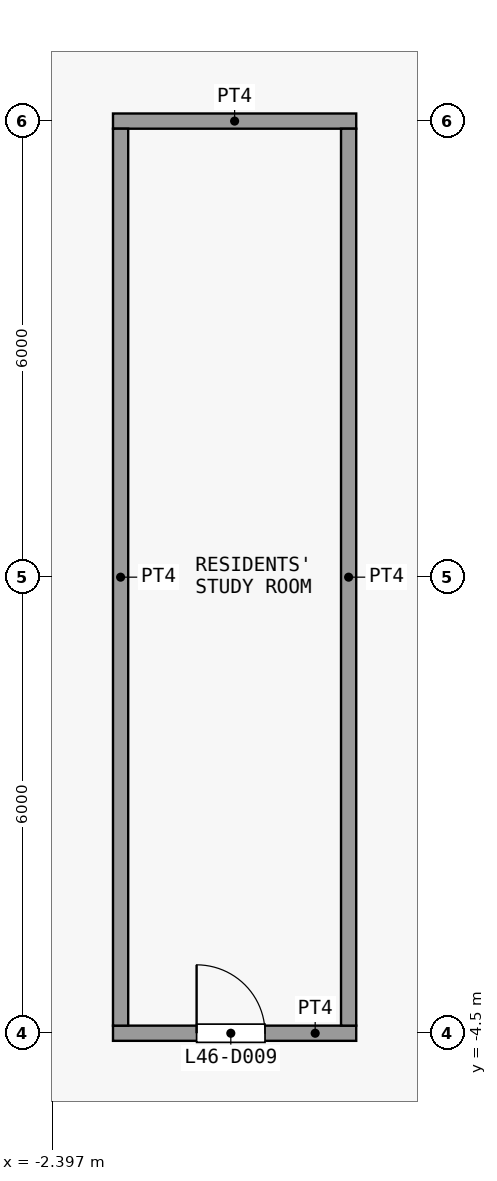
"""IFC4 building model, lengths in metres.
Left out: names, types, materials, properties, quantities, classifications, styles, units other than length and angle.
Written with IfcOpenShell. Run it as: python <this file> out.ifc"""

import sys

from ifc_helpers import new_model, si_unit, direction, frame, frame_2d, origin, place, context, subcontext, project, spatial, rectangle, extrude, element, fill, save


model = new_model("IFC4")
c1 = context("Model", 3, precision=1e-05, world=origin(), true_north=direction((0.0, 1.0)))
c2 = subcontext(c1, "Body", "Model", "MODEL_VIEW")
j1 = project(units=[si_unit("LENGTHUNIT", "METRE"), si_unit("PLANEANGLEUNIT", "RADIAN")], contexts=[c1])
p1 = place(None, origin())
s1 = spatial("IfcSite", under=j1, at=p1, CompositionType="ELEMENT")
p2 = place(p1, origin())
s2 = spatial("IfcBuilding", under=s1, at=p2, CompositionType="ELEMENT")
p3 = place(p2, frame((0.0, 0.0, 185.3)))
s3 = spatial("IfcBuildingStorey", under=s2, at=p3, CompositionType="ELEMENT", Elevation=185.3)
p4 = place(p3, frame((-1.6, -4.5, 0.0), z_axis=(0.0, 0.0, 1.0), x_axis=(1.0, 0.0, 0.0)))
e1 = element("IfcWall", 1, at=p4, inside=s3, PredefinedType="PARTITIONING", context=c2, shape_type="SweptSolid", body=[
    extrude(rectangle(XDim=3.2, YDim=0.2, at=frame_2d((1.6, 0.0))), origin(), (0.0, 0.0, 1.0), 3.3),
])
p5 = place(p4, frame((1.1, 0.0, 0.0)))
e2 = element("IfcOpeningElement", 2, at=p5, cuts=e1, PredefinedType="OPENING", context=c2, shape_type="SweptSolid", body=[
    extrude(rectangle(XDim=0.9, YDim=2.1, at=frame_2d((0.45, 1.05))), frame((0.0, 0.11, 0.0), z_axis=(0.0, -1.0, 0.0), x_axis=(1.0, 0.0, 0.0)), (0.0, 0.0, 1.0), 0.22),
])
p6 = place(p3, frame((-1.6, 7.5, 0.0), z_axis=(0.0, 0.0, 1.0), x_axis=(1.0, 0.0, 0.0)))
e3 = element("IfcWall", 3, at=p6, inside=s3, PredefinedType="PARTITIONING", context=c2, shape_type="SweptSolid", body=[
    extrude(rectangle(XDim=3.2, YDim=0.2, at=frame_2d((1.6, 0.0))), origin(), (0.0, 0.0, 1.0), 3.3),
])
for number, where, z_axis, x_axis in (
    (4, (-1.5, -4.4, 0.0), (0.0, 0.0, 1.0), (0.0, 1.0, 0.0)),
    (5, (1.5, -4.4, 0.0), (0.0, 0.0, 1.0), (0.0, 1.0, 0.0)),
):
    element("IfcWall", number, at=place(p3, frame(where, z_axis=z_axis, x_axis=x_axis)), inside=s3, PredefinedType="PARTITIONING", context=c2, shape_type="SweptSolid", body=[
        extrude(rectangle(XDim=11.8, YDim=0.2, at=frame_2d((5.9, 0.0))), origin(), (0.0, 0.0, 1.0), 3.3),
    ])
p7 = place(p5, origin())
e6 = element("IfcDoor", 6, at=p7, inside=s3, OperationType="SINGLE_SWING_RIGHT", PredefinedType="DOOR", context=c2, shape_type="SweptSolid", body=[
    extrude(rectangle(XDim=0.9, YDim=2.1, at=frame_2d((0.45, 1.05))), frame((0.0, 0.025, 0.0), z_axis=(0.0, -1.0, 0.0), x_axis=(1.0, 0.0, 0.0)), (0.0, 0.0, 1.0), 0.05),
])
fill(e2, e6)
save(model, sys.argv[1])
